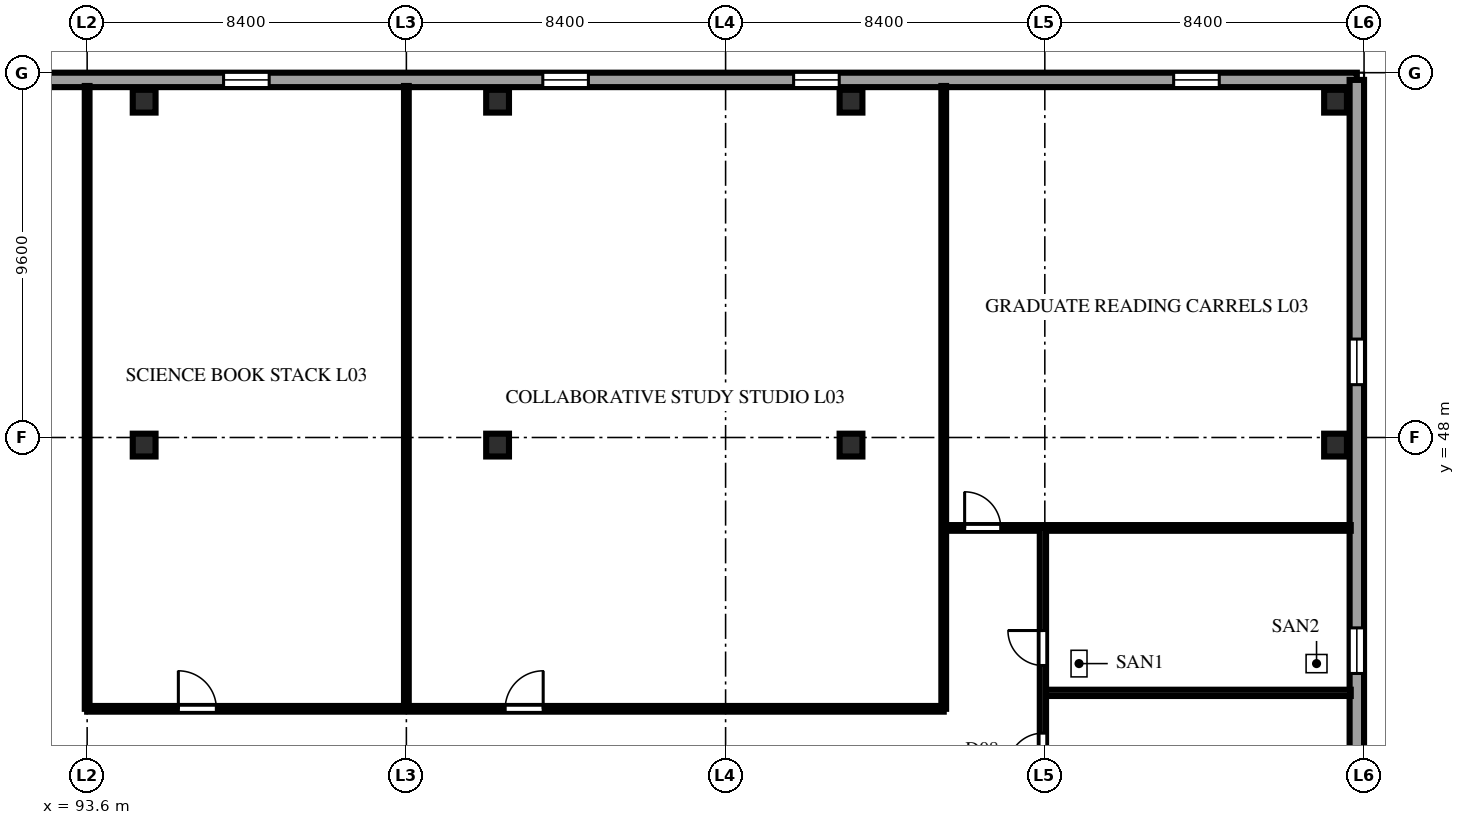
"""IFC4 building model, lengths in metres.
Left out: names, types, materials, properties, quantities, classifications, styles, units other than length and angle.
Written with IfcOpenShell. Run it as: python <this file> out.ifc"""

import sys

from ifc_helpers import new_model, si_unit, direction, frame, frame_2d, origin, origin_2d, place, context, subcontext, project, spatial, rectangle, extrude, element, fill, save


model = new_model("IFC4")
c1 = context("Model", 3, precision=1e-05, world=origin(), true_north=direction((0.0, 1.0)))
c2 = subcontext(c1, "Body", "Model", "MODEL_VIEW")
j1 = project(units=[si_unit("LENGTHUNIT", "METRE"), si_unit("PLANEANGLEUNIT", "RADIAN")], contexts=[c1])
p1 = place(None, origin())
s1 = spatial("IfcSite", under=j1, at=p1, CompositionType="ELEMENT")
p2 = place(p1, origin())
s2 = spatial("IfcBuilding", under=s1, at=p2, CompositionType="ELEMENT")
p3 = place(p2, frame((0.0, 0.0, 15.0)))
s3 = spatial("IfcBuildingStorey", under=s2, at=p3, CompositionType="ELEMENT", Elevation=15.0)
for number, where, z_axis, x_axis in (
    (1, (95.1, 47.8, 0.0), (0.0, 0.0, 1.0), (1.0, 0.0, 0.0)),
    (2, (95.1, 56.85, 0.0), (0.0, 0.0, 1.0), (1.0, 0.0, 0.0)),
    (3, (104.4, 47.8, 0.0), (0.0, 0.0, 1.0), (1.0, 0.0, 0.0)),
    (4, (104.4, 56.85, 0.0), (0.0, 0.0, 1.0), (1.0, 0.0, 0.0)),
    (5, (113.7, 47.8, 0.0), (0.0, 0.0, 1.0), (1.0, 0.0, 0.0)),
    (6, (113.7, 56.85, 0.0), (0.0, 0.0, 1.0), (1.0, 0.0, 0.0)),
    (7, (126.45, 47.8, 0.0), (0.0, 0.0, 1.0), (1.0, 0.0, 0.0)),
    (8, (126.45, 56.85, 0.0), (0.0, 0.0, 1.0), (1.0, 0.0, 0.0)),
):
    element("IfcColumn", number, at=place(p3, frame(where, z_axis=z_axis, x_axis=x_axis)), inside=s3, PredefinedType="COLUMN", context=c2, shape_type="SweptSolid", body=[
        extrude(rectangle(XDim=0.6, YDim=0.6, at=origin_2d()), origin(), (0.0, 0.0, 1.0), 4.6),
    ])
p4 = place(p3, frame((85.39, 57.41, 0.0), z_axis=(0.0, 0.0, 1.0), x_axis=(1.0, 0.0, 0.0)))
e9 = element("IfcWall", 9, at=p4, inside=s3, PredefinedType="SOLIDWALL", context=c2, shape_type="SweptSolid", body=[
    extrude(rectangle(XDim=41.62, YDim=0.38, at=frame_2d((20.81, 0.0))), origin(), (0.0, 0.0, 1.0), 4.25),
])
p5 = place(p4, frame((5.0, 0.0, 1.25)))
e10 = element("IfcOpeningElement", 10, at=p5, cuts=e9, PredefinedType="OPENING", context=c2, shape_type="SweptSolid", body=[
    extrude(rectangle(XDim=1.2, YDim=1.65, at=frame_2d((0.6, 0.825))), frame((0.0, 0.202, 0.0), z_axis=(0.0, -1.0, 0.0), x_axis=(1.0, 0.0, 0.0)), (0.0, 0.0, 1.0), 0.404),
])
p6 = place(p4, frame((11.8, 0.0, 1.25)))
e11 = element("IfcOpeningElement", 11, at=p6, cuts=e9, PredefinedType="OPENING", context=c2, shape_type="SweptSolid", body=[
    extrude(rectangle(XDim=1.2, YDim=1.65, at=frame_2d((0.6, 0.825))), frame((0.0, 0.202, 0.0), z_axis=(0.0, -1.0, 0.0), x_axis=(1.0, 0.0, 0.0)), (0.0, 0.0, 1.0), 0.404),
])
p7 = place(p4, frame((20.2, 0.0, 1.25)))
e12 = element("IfcOpeningElement", 12, at=p7, cuts=e9, PredefinedType="OPENING", context=c2, shape_type="SweptSolid", body=[
    extrude(rectangle(XDim=1.2, YDim=1.65, at=frame_2d((0.6, 0.825))), frame((0.0, 0.202, 0.0), z_axis=(0.0, -1.0, 0.0), x_axis=(1.0, 0.0, 0.0)), (0.0, 0.0, 1.0), 0.404),
])
p8 = place(p4, frame((26.8, 0.0, 1.25)))
e13 = element("IfcOpeningElement", 13, at=p8, cuts=e9, PredefinedType="OPENING", context=c2, shape_type="SweptSolid", body=[
    extrude(rectangle(XDim=1.2, YDim=1.65, at=frame_2d((0.6, 0.825))), frame((0.0, 0.202, 0.0), z_axis=(0.0, -1.0, 0.0), x_axis=(1.0, 0.0, 0.0)), (0.0, 0.0, 1.0), 0.404),
])
p9 = place(p4, frame((36.8, 0.0, 1.25)))
e14 = element("IfcOpeningElement", 14, at=p9, cuts=e9, PredefinedType="OPENING", context=c2, shape_type="SweptSolid", body=[
    extrude(rectangle(XDim=1.2, YDim=1.65, at=frame_2d((0.6, 0.825))), frame((0.0, 0.202, 0.0), z_axis=(0.0, -1.0, 0.0), x_axis=(1.0, 0.0, 0.0)), (0.0, 0.0, 1.0), 0.404),
])
p10 = place(p3, frame((127.01, 0.19, 0.0), z_axis=(0.0, 0.0, 1.0), x_axis=(0.0, 1.0, 0.0)))
e15 = element("IfcWall", 15, at=p10, inside=s3, PredefinedType="SOLIDWALL", context=c2, shape_type="SweptSolid", body=[
    extrude(rectangle(XDim=57.22, YDim=0.38, at=frame_2d((28.61, 0.0))), origin(), (0.0, 0.0, 1.0), 4.25),
])
p11 = place(p10, frame((3.6, 0.0, 1.25)))
e16 = element("IfcOpeningElement", 16, at=p11, cuts=e15, PredefinedType="OPENING", context=c2, shape_type="SweptSolid", body=[
    extrude(rectangle(XDim=1.2, YDim=1.65, at=frame_2d((0.6, 0.825))), frame((0.0, 0.202, 0.0), z_axis=(0.0, -1.0, 0.0), x_axis=(1.0, 0.0, 0.0)), (0.0, 0.0, 1.0), 0.404),
])
p12 = place(p10, frame((11.2, 0.0, 1.25)))
e17 = element("IfcOpeningElement", 17, at=p12, cuts=e15, PredefinedType="OPENING", context=c2, shape_type="SweptSolid", body=[
    extrude(rectangle(XDim=1.2, YDim=1.65, at=frame_2d((0.6, 0.825))), frame((0.0, 0.202, 0.0), z_axis=(0.0, -1.0, 0.0), x_axis=(1.0, 0.0, 0.0)), (0.0, 0.0, 1.0), 0.404),
])
p13 = place(p10, frame((41.6, 0.0, 1.25)))
e18 = element("IfcOpeningElement", 18, at=p13, cuts=e15, PredefinedType="OPENING", context=c2, shape_type="SweptSolid", body=[
    extrude(rectangle(XDim=1.2, YDim=1.65, at=frame_2d((0.6, 0.825))), frame((0.0, 0.202, 0.0), z_axis=(0.0, -1.0, 0.0), x_axis=(1.0, 0.0, 0.0)), (0.0, 0.0, 1.0), 0.404),
])
p14 = place(p10, frame((49.2, 0.0, 1.25)))
e19 = element("IfcOpeningElement", 19, at=p14, cuts=e15, PredefinedType="OPENING", context=c2, shape_type="SweptSolid", body=[
    extrude(rectangle(XDim=1.2, YDim=1.65, at=frame_2d((0.6, 0.825))), frame((0.0, 0.202, 0.0), z_axis=(0.0, -1.0, 0.0), x_axis=(1.0, 0.0, 0.0)), (0.0, 0.0, 1.0), 0.404),
])
for number, where, z_axis, x_axis in (
    (20, (93.6, 40.86, 0.0), (0.0, 0.0, 1.0), (0.0, 1.0, 0.0)),
    (21, (102.0, 40.86, 0.0), (0.0, 0.0, 1.0), (0.0, 1.0, 0.0)),
    (22, (116.14, 40.86, 0.0), (0.0, 0.0, 1.0), (0.0, 1.0, 0.0)),
):
    element("IfcWall", number, at=place(p3, frame(where, z_axis=z_axis, x_axis=x_axis)), inside=s3, PredefinedType="PARTITIONING", context=c2, shape_type="SweptSolid", body=[
        extrude(rectangle(XDim=16.39, YDim=0.125, at=frame_2d((8.195, 0.0))), origin(), (0.0, 0.0, 1.0), 4.25),
    ])
p15 = place(p3, frame((93.6, 40.86, 0.0), z_axis=(0.0, 0.0, 1.0), x_axis=(1.0, 0.0, 0.0)))
e23 = element("IfcWall", 23, at=p15, inside=s3, PredefinedType="PARTITIONING", context=c2, shape_type="SweptSolid", body=[
    extrude(rectangle(XDim=22.54, YDim=0.15, at=frame_2d((11.27, 0.0))), origin(), (0.0, 0.0, 1.0), 4.25),
])
p16 = place(p15, frame((2.4, 0.0, 0.0)))
e24 = element("IfcOpeningElement", 24, at=p16, cuts=e23, PredefinedType="OPENING", context=c2, shape_type="SweptSolid", body=[
    extrude(rectangle(XDim=1.0, YDim=2.2, at=frame_2d((0.5, 1.1))), frame((0.0, 0.087, 0.0), z_axis=(0.0, -1.0, 0.0), x_axis=(1.0, 0.0, 0.0)), (0.0, 0.0, 1.0), 0.174),
])
p17 = place(p15, frame((11.0, 0.0, 0.0)))
e25 = element("IfcOpeningElement", 25, at=p17, cuts=e23, PredefinedType="OPENING", context=c2, shape_type="SweptSolid", body=[
    extrude(rectangle(XDim=1.0, YDim=2.2, at=frame_2d((0.5, 1.1))), frame((0.0, 0.087, 0.0), z_axis=(0.0, -1.0, 0.0), x_axis=(1.0, 0.0, 0.0)), (0.0, 0.0, 1.0), 0.174),
])
p18 = place(p3, frame((118.75, 41.28, 0.0), z_axis=(0.0, 0.0, 1.0), x_axis=(1.0, 0.0, 0.0)))
e26 = element("IfcWall", 26, at=p18, inside=s3, PredefinedType="PLUMBINGWALL", context=c2, shape_type="SweptSolid", body=[
    extrude(rectangle(XDim=8.1, YDim=0.165, at=frame_2d((4.05, 0.0))), origin(), (0.0, 0.0, 1.0), 4.25),
])
p19 = place(p3, frame((116.14, 45.62, 0.0), z_axis=(0.0, 0.0, 1.0), x_axis=(1.0, 0.0, 0.0)))
e27 = element("IfcWall", 27, at=p19, inside=s3, PredefinedType="PARTITIONING", context=c2, shape_type="SweptSolid", body=[
    extrude(rectangle(XDim=10.71, YDim=0.15, at=frame_2d((5.355, 0.0))), origin(), (0.0, 0.0, 1.0), 4.25),
])
p20 = place(p19, frame((0.55, 0.0, 0.0)))
e28 = element("IfcOpeningElement", 28, at=p20, cuts=e27, PredefinedType="OPENING", context=c2, shape_type="SweptSolid", body=[
    extrude(rectangle(XDim=0.95, YDim=2.15, at=frame_2d((0.475, 1.075))), frame((0.0, 0.087, 0.0), z_axis=(0.0, -1.0, 0.0), x_axis=(1.0, 0.0, 0.0)), (0.0, 0.0, 1.0), 0.174),
])
p21 = place(p3, frame((118.75, 38.4, 0.0), z_axis=(0.0, 0.0, 1.0), x_axis=(0.0, 1.0, 0.0)))
e29 = element("IfcWall", 29, at=p21, inside=s3, PredefinedType="PLUMBINGWALL", context=c2, shape_type="SweptSolid", body=[
    extrude(rectangle(XDim=7.22, YDim=0.165, at=frame_2d((3.61, 0.0))), origin(), (0.0, 0.0, 1.0), 4.25),
])
p22 = place(p21, frame((0.9, 0.0, 0.0)))
e30 = element("IfcOpeningElement", 30, at=p22, cuts=e29, PredefinedType="OPENING", context=c2, shape_type="SweptSolid", body=[
    extrude(rectangle(XDim=0.92, YDim=2.15, at=frame_2d((0.46, 1.075))), frame((0.0, 0.094, 0.0), z_axis=(0.0, -1.0, 0.0), x_axis=(1.0, 0.0, 0.0)), (0.0, 0.0, 1.0), 0.189),
])
p23 = place(p21, frame((3.6, 0.0, 0.0)))
e31 = element("IfcOpeningElement", 31, at=p23, cuts=e29, PredefinedType="OPENING", context=c2, shape_type="SweptSolid", body=[
    extrude(rectangle(XDim=0.92, YDim=2.15, at=frame_2d((0.46, 1.075))), frame((0.0, 0.094, 0.0), z_axis=(0.0, -1.0, 0.0), x_axis=(1.0, 0.0, 0.0)), (0.0, 0.0, 1.0), 0.189),
])
p24 = place(p6, origin())
e32 = element("IfcWindow", 32, at=p24, inside=s3, PartitioningType="SINGLE_PANEL", PredefinedType="WINDOW", context=c2, shape_type="SweptSolid", body=[
    extrude(rectangle(XDim=1.2, YDim=1.65, at=frame_2d((0.6, 0.825))), frame((0.0, 0.11, 0.0), z_axis=(0.0, -1.0, 0.0), x_axis=(1.0, 0.0, 0.0)), (0.0, 0.0, 1.0), 0.06),
])
fill(e11, e32)
p25 = place(p7, origin())
e33 = element("IfcWindow", 33, at=p25, inside=s3, PartitioningType="SINGLE_PANEL", PredefinedType="WINDOW", context=c2, shape_type="SweptSolid", body=[
    extrude(rectangle(XDim=1.2, YDim=1.65, at=frame_2d((0.6, 0.825))), frame((0.0, 0.11, 0.0), z_axis=(0.0, -1.0, 0.0), x_axis=(1.0, 0.0, 0.0)), (0.0, 0.0, 1.0), 0.06),
])
fill(e12, e33)
p26 = place(p8, origin())
e34 = element("IfcWindow", 34, at=p26, inside=s3, PartitioningType="SINGLE_PANEL", PredefinedType="WINDOW", context=c2, shape_type="SweptSolid", body=[
    extrude(rectangle(XDim=1.2, YDim=1.65, at=frame_2d((0.6, 0.825))), frame((0.0, 0.11, 0.0), z_axis=(0.0, -1.0, 0.0), x_axis=(1.0, 0.0, 0.0)), (0.0, 0.0, 1.0), 0.06),
])
fill(e13, e34)
p27 = place(p9, origin())
e35 = element("IfcWindow", 35, at=p27, inside=s3, PartitioningType="SINGLE_PANEL", PredefinedType="WINDOW", context=c2, shape_type="SweptSolid", body=[
    extrude(rectangle(XDim=1.2, YDim=1.65, at=frame_2d((0.6, 0.825))), frame((0.0, 0.11, 0.0), z_axis=(0.0, -1.0, 0.0), x_axis=(1.0, 0.0, 0.0)), (0.0, 0.0, 1.0), 0.06),
])
fill(e14, e35)
p28 = place(p13, origin())
e36 = element("IfcWindow", 36, at=p28, inside=s3, PartitioningType="SINGLE_PANEL", PredefinedType="WINDOW", context=c2, shape_type="SweptSolid", body=[
    extrude(rectangle(XDim=1.2, YDim=1.65, at=frame_2d((0.6, 0.825))), frame((0.0, 0.11, 0.0), z_axis=(0.0, -1.0, 0.0), x_axis=(1.0, 0.0, 0.0)), (0.0, 0.0, 1.0), 0.06),
])
fill(e18, e36)
p29 = place(p14, origin())
e37 = element("IfcWindow", 37, at=p29, inside=s3, PartitioningType="SINGLE_PANEL", PredefinedType="WINDOW", context=c2, shape_type="SweptSolid", body=[
    extrude(rectangle(XDim=1.2, YDim=1.65, at=frame_2d((0.6, 0.825))), frame((0.0, 0.11, 0.0), z_axis=(0.0, -1.0, 0.0), x_axis=(1.0, 0.0, 0.0)), (0.0, 0.0, 1.0), 0.06),
])
fill(e19, e37)
p30 = place(p16, origin())
e38 = element("IfcDoor", 38, at=p30, inside=s3, OperationType="SINGLE_SWING_LEFT", PredefinedType="DOOR", context=c2, shape_type="SweptSolid", body=[
    extrude(rectangle(XDim=1.0, YDim=2.2, at=frame_2d((0.5, 1.1))), frame((0.0, 0.025, 0.0), z_axis=(0.0, -1.0, 0.0), x_axis=(1.0, 0.0, 0.0)), (0.0, 0.0, 1.0), 0.05),
])
fill(e24, e38)
p31 = place(p17, origin())
e39 = element("IfcDoor", 39, at=p31, inside=s3, OperationType="SINGLE_SWING_RIGHT", PredefinedType="DOOR", context=c2, shape_type="SweptSolid", body=[
    extrude(rectangle(XDim=1.0, YDim=2.2, at=frame_2d((0.5, 1.1))), frame((0.0, 0.025, 0.0), z_axis=(0.0, -1.0, 0.0), x_axis=(1.0, 0.0, 0.0)), (0.0, 0.0, 1.0), 0.05),
])
fill(e25, e39)
p32 = place(p20, origin())
e40 = element("IfcDoor", 40, at=p32, inside=s3, OperationType="SINGLE_SWING_LEFT", PredefinedType="DOOR", context=c2, shape_type="SweptSolid", body=[
    extrude(rectangle(XDim=0.95, YDim=2.15, at=frame_2d((0.475, 1.075))), frame((0.0, 0.025, 0.0), z_axis=(0.0, -1.0, 0.0), x_axis=(1.0, 0.0, 0.0)), (0.0, 0.0, 1.0), 0.05),
])
fill(e28, e40)
p33 = place(p22, origin())
e41 = element("IfcDoor", 41, at=p33, inside=s3, OperationType="SINGLE_SWING_LEFT", PredefinedType="DOOR", context=c2, shape_type="SweptSolid", body=[
    extrude(rectangle(XDim=0.92, YDim=2.15, at=frame_2d((0.46, 1.075))), frame((0.0, 0.025, 0.0), z_axis=(0.0, -1.0, 0.0), x_axis=(1.0, 0.0, 0.0)), (0.0, 0.0, 1.0), 0.05),
])
fill(e30, e41)
p34 = place(p23, origin())
e42 = element("IfcDoor", 42, at=p34, inside=s3, OperationType="SINGLE_SWING_RIGHT", PredefinedType="DOOR", context=c2, shape_type="SweptSolid", body=[
    extrude(rectangle(XDim=0.92, YDim=2.15, at=frame_2d((0.46, 1.075))), frame((0.0, 0.025, 0.0), z_axis=(0.0, -1.0, 0.0), x_axis=(1.0, 0.0, 0.0)), (0.0, 0.0, 1.0), 0.05),
])
fill(e31, e42)
save(model, sys.argv[1])
